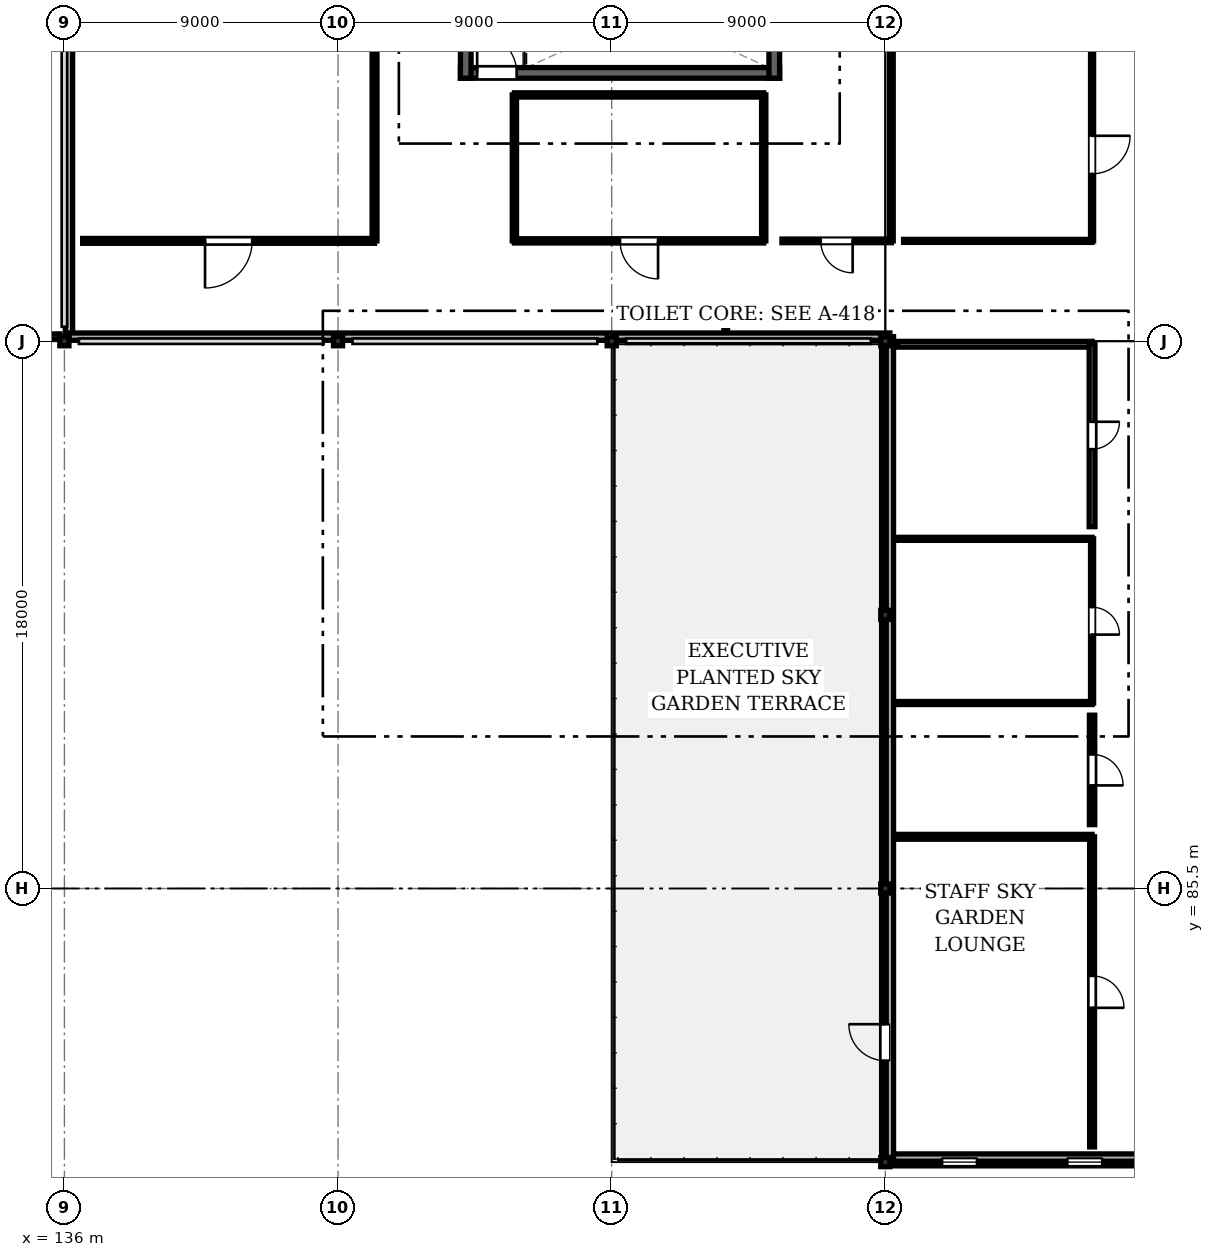
"""IFC4 building model, lengths in metres.
Left out: names, types, materials, properties, quantities, classifications, styles, units other than length and angle.
Written with IfcOpenShell. Run it as: python <this file> out.ifc"""

import sys

from ifc_helpers import new_model, si_unit, direction, frame, frame_2d, origin, origin_2d, place, context, subcontext, project, spatial, rectangle, i_section, extrude, element, fill, save


model = new_model("IFC4")
c1 = context("Model", 3, precision=1e-05, world=origin(), true_north=direction((0.0, 1.0)))
c2 = subcontext(c1, "Body", "Model", "MODEL_VIEW")
j1 = project(units=[si_unit("LENGTHUNIT", "METRE"), si_unit("PLANEANGLEUNIT", "RADIAN")], contexts=[c1])
p1 = place(None, origin())
s1 = spatial("IfcSite", under=j1, at=p1, CompositionType="ELEMENT")
p2 = place(p1, origin())
s2 = spatial("IfcBuilding", under=s1, at=p2, CompositionType="ELEMENT")
p3 = place(p2, frame((0.0, 0.0, 20.8)))
s3 = spatial("IfcBuildingStorey", under=s2, at=p3, CompositionType="ELEMENT", Elevation=20.8)
for number, where, z_axis, x_axis in (
    (1, (136.0, 103.5, 0.0), (0.0, 0.0, 1.0), (1.0, 0.0, 0.0)),
    (2, (145.0, 103.5, 0.0), (0.0, 0.0, 1.0), (1.0, 0.0, 0.0)),
    (3, (154.0, 103.5, 0.0), (0.0, 0.0, 1.0), (1.0, 0.0, 0.0)),
    (4, (163.0, 76.5, 0.0), (0.0, 0.0, 1.0), (1.0, 0.0, 0.0)),
    (5, (163.0, 85.5, 0.0), (0.0, 0.0, 1.0), (1.0, 0.0, 0.0)),
    (6, (163.0, 94.5, 0.0), (0.0, 0.0, 1.0), (1.0, 0.0, 0.0)),
    (7, (163.0, 103.5, 0.0), (0.0, 0.0, 1.0), (1.0, 0.0, 0.0)),
):
    element("IfcColumn", number, at=place(p3, frame(where, z_axis=z_axis, x_axis=x_axis)), inside=s3, PredefinedType="COLUMN", context=c2, shape_type="SweptSolid", body=[
        extrude(i_section(OverallWidth=0.3, OverallDepth=0.3, WebThickness=0.01, FlangeThickness=0.015, FilletRadius=0.018, at=origin_2d()), origin(), (0.0, 0.0, 1.0), 2.85),
    ])
p4 = place(p3, frame((171.995, 76.5, 0.0), z_axis=(0.0, 0.0, 1.0), x_axis=(-1.0, 0.0, 0.0)))
e8 = element("IfcWall", 8, at=p4, inside=s3, PredefinedType="SOLIDWALL", context=c2, shape_type="SweptSolid", body=[
    extrude(rectangle(XDim=8.99, YDim=0.245, at=frame_2d((4.495, 0.0))), origin(), (0.0, 0.0, 1.0), 2.23),
])
p5 = place(p4, frame((1.86, 0.0, 0.7)))
e9 = element("IfcOpeningElement", 9, at=p5, cuts=e8, PredefinedType="OPENING", context=c2, shape_type="SweptSolid", body=[
    extrude(rectangle(XDim=1.15, YDim=1.45, at=frame_2d((0.575, 0.725))), frame((0.0, 0.133, 0.0), z_axis=(0.0, -1.0, 0.0), x_axis=(1.0, 0.0, 0.0)), (0.0, 0.0, 1.0), 0.265),
])
p6 = place(p4, frame((5.98, 0.0, 0.7)))
e10 = element("IfcOpeningElement", 10, at=p6, cuts=e8, PredefinedType="OPENING", context=c2, shape_type="SweptSolid", body=[
    extrude(rectangle(XDim=1.15, YDim=1.45, at=frame_2d((0.575, 0.725))), frame((0.0, 0.133, 0.0), z_axis=(0.0, -1.0, 0.0), x_axis=(1.0, 0.0, 0.0)), (0.0, 0.0, 1.0), 0.265),
])
p7 = place(p3, frame((163.0, 76.65, 0.0), z_axis=(0.0, 0.0, 1.0), x_axis=(0.0, 1.0, 0.0)))
e11 = element("IfcWall", 11, at=p7, inside=s3, PredefinedType="SOLIDWALL", context=c2, shape_type="SweptSolid", body=[
    extrude(rectangle(XDim=8.7, YDim=0.245, at=frame_2d((4.35, 0.0))), origin(), (0.0, 0.0, 1.0), 2.23),
])
p8 = place(p7, frame((3.187, 0.0, 0.0)))
e12 = element("IfcOpeningElement", 12, at=p8, cuts=e11, PredefinedType="OPENING", context=c2, shape_type="SweptSolid", body=[
    extrude(rectangle(XDim=1.2, YDim=2.1, at=frame_2d((0.6, 1.05))), frame((0.0, 0.133, 0.0), z_axis=(0.0, -1.0, 0.0), x_axis=(1.0, 0.0, 0.0)), (0.0, 0.0, 1.0), 0.265),
])
p9 = place(p3, frame((163.0, 85.65, 0.0), z_axis=(0.0, 0.0, 1.0), x_axis=(0.0, 1.0, 0.0)))
e13 = element("IfcWall", 13, at=p9, inside=s3, PredefinedType="SOLIDWALL", context=c2, shape_type="SweptSolid", body=[
    extrude(rectangle(XDim=8.7, YDim=0.245, at=frame_2d((4.35, 0.0))), origin(), (0.0, 0.0, 1.0), 2.23),
])
p10 = place(p3, frame((163.0, 94.65, 0.0), z_axis=(0.0, 0.0, 1.0), x_axis=(0.0, 1.0, 0.0)))
e14 = element("IfcWall", 14, at=p10, inside=s3, PredefinedType="SOLIDWALL", context=c2, shape_type="SweptSolid", body=[
    extrude(rectangle(XDim=8.7, YDim=0.245, at=frame_2d((4.35, 0.0))), origin(), (0.0, 0.0, 1.0), 2.18),
])
p11 = place(p3, frame((126.15, 103.65, 0.0), z_axis=(0.0, 0.0, 1.0), x_axis=(1.0, 0.0, 0.0)))
e15 = element("IfcWall", 15, at=p11, inside=s3, PredefinedType="PARAPET", context=c2, shape_type="SweptSolid", body=[
    extrude(rectangle(XDim=9.7, YDim=0.18, at=frame_2d((4.85, 0.0))), origin(), (0.0, 0.0, 1.0), 1.15),
])
p12 = place(p3, frame((163.15, 76.65, 2.85), z_axis=(0.0, 0.0, 1.0), x_axis=(1.0, 0.0, 0.0)))
e16 = element("IfcWall", 16, at=p12, inside=s3, PredefinedType="PARAPET", context=c2, shape_type="SweptSolid", body=[
    extrude(rectangle(XDim=24.7, YDim=0.24, at=frame_2d((12.35, 0.0))), origin(), (0.0, 0.0, 1.0), 0.34),
])
p13 = place(p3, frame((136.15, 125.85, 2.85), z_axis=(0.0, 0.0, 1.0), x_axis=(0.0, -1.0, 0.0)))
e17 = element("IfcWall", 17, at=p13, inside=s3, PredefinedType="PARAPET", context=c2, shape_type="SweptSolid", body=[
    extrude(rectangle(XDim=22.2, YDim=0.24, at=frame_2d((11.1, 0.0))), origin(), (0.0, 0.0, 1.0), 0.34),
])
for number, where, z_axis, x_axis in (
    (18, (136.15, 103.65, 2.85), (0.0, 0.0, 1.0), (1.0, 0.0, 0.0)),
    (19, (163.15, 103.65, 2.85), (0.0, 0.0, 1.0), (0.0, -1.0, 0.0)),
):
    element("IfcWall", number, at=place(p3, frame(where, z_axis=z_axis, x_axis=x_axis)), inside=s3, PredefinedType="PARAPET", context=c2, shape_type="SweptSolid", body=[
        extrude(rectangle(XDim=27.0, YDim=0.24, at=frame_2d((13.5, 0.0))), origin(), (0.0, 0.0, 1.0), 0.34),
    ])
p14 = place(p3, frame((149.025, 112.325, 0.0), z_axis=(0.0, 0.0, 1.0), x_axis=(1.0, 0.0, 0.0)))
e20 = element("IfcWall", 20, at=p14, inside=s3, PredefinedType="SHEAR", context=c2, shape_type="SweptSolid", body=[
    extrude(rectangle(XDim=10.498, YDim=0.35, at=frame_2d((5.249, 0.0))), origin(), (0.0, 0.0, 1.0), 2.645),
])
p15 = place(p14, frame((0.55, 0.0, 0.0)))
e21 = element("IfcOpeningElement", 21, at=p15, cuts=e20, PredefinedType="OPENING", context=c2, shape_type="SweptSolid", body=[
    extrude(rectangle(XDim=1.3, YDim=2.1, at=frame_2d((0.65, 1.05))), frame((0.0, 0.185, 0.0), z_axis=(0.0, -1.0, 0.0), x_axis=(1.0, 0.0, 0.0)), (0.0, 0.0, 1.0), 0.37),
])
for number, where, z_axis, x_axis in (
    (22, (159.347, 112.15, 0.0), (0.0, 0.0, 1.0), (0.0, 1.0, 0.0)),
    (23, (149.2, 116.47, 0.0), (0.0, 0.0, 1.0), (0.0, -1.0, 0.0)),
):
    element("IfcWall", number, at=place(p3, frame(where, z_axis=z_axis, x_axis=x_axis)), inside=s3, PredefinedType="SHEAR", context=c2, shape_type="SweptSolid", body=[
        extrude(rectangle(XDim=4.32, YDim=0.35, at=frame_2d((2.16, 0.0))), origin(), (0.0, 0.0, 1.0), 2.645),
    ])
p16 = place(p3, frame((146.2, 106.8, 0.0), z_axis=(0.0, 0.0, 1.0), x_axis=(-1.0, 0.0, 0.0)))
e24 = element("IfcWall", 24, at=p16, inside=s3, PredefinedType="PARTITIONING", context=c2, shape_type="SweptSolid", body=[
    extrude(rectangle(XDim=9.6, YDim=0.16, at=frame_2d((4.8, 0.0))), origin(), (0.0, 0.0, 1.0), 2.18),
])
p17 = place(p16, frame((4.025, 0.0, 0.0)))
e25 = element("IfcOpeningElement", 25, at=p17, cuts=e24, PredefinedType="OPENING", context=c2, shape_type="SweptSolid", body=[
    extrude(rectangle(XDim=1.55, YDim=2.1, at=frame_2d((0.775, 1.05))), frame((0.0, 0.09, 0.0), z_axis=(0.0, -1.0, 0.0), x_axis=(1.0, 0.0, 0.0)), (0.0, 0.0, 1.0), 0.18),
])
p18 = place(p3, frame((146.2, 125.4, 0.0), z_axis=(0.0, 0.0, 1.0), x_axis=(0.0, -1.0, 0.0)))
e26 = element("IfcWall", 26, at=p18, inside=s3, PredefinedType="PARTITIONING", context=c2, shape_type="SweptSolid", body=[
    extrude(rectangle(XDim=18.6, YDim=0.16, at=frame_2d((9.3, 0.0))), origin(), (0.0, 0.0, 1.0), 2.23),
])
p19 = place(p3, frame((159.0, 106.8, 0.0), z_axis=(0.0, 0.0, 1.0), x_axis=(-1.0, 0.0, 0.0)))
e27 = element("IfcWall", 27, at=p19, inside=s3, PredefinedType="PARTITIONING", context=c2, shape_type="SweptSolid", body=[
    extrude(rectangle(XDim=8.2, YDim=0.14, at=frame_2d((4.1, 0.0))), origin(), (0.0, 0.0, 1.0), 2.18),
])
p20 = place(p19, frame((3.475, 0.0, 0.0)))
e28 = element("IfcOpeningElement", 28, at=p20, cuts=e27, PredefinedType="OPENING", context=c2, shape_type="SweptSolid", body=[
    extrude(rectangle(XDim=1.25, YDim=2.1, at=frame_2d((0.625, 1.05))), frame((0.0, 0.08, 0.0), z_axis=(0.0, -1.0, 0.0), x_axis=(1.0, 0.0, 0.0)), (0.0, 0.0, 1.0), 0.16),
])
p21 = place(p3, frame((150.8, 111.6, 0.0), z_axis=(0.0, 0.0, 1.0), x_axis=(1.0, 0.0, 0.0)))
e29 = element("IfcWall", 29, at=p21, inside=s3, PredefinedType="PARTITIONING", context=c2, shape_type="SweptSolid", body=[
    extrude(rectangle(XDim=8.2, YDim=0.14, at=frame_2d((4.1, 0.0))), origin(), (0.0, 0.0, 1.0), 2.18),
])
p22 = place(p3, frame((150.8, 106.8, 0.0), z_axis=(0.0, 0.0, 1.0), x_axis=(0.0, 1.0, 0.0)))
e30 = element("IfcWall", 30, at=p22, inside=s3, PredefinedType="PARTITIONING", context=c2, shape_type="SweptSolid", body=[
    extrude(rectangle(XDim=4.8, YDim=0.14, at=frame_2d((2.4, 0.0))), origin(), (0.0, 0.0, 1.0), 2.62),
])
p23 = place(p3, frame((159.0, 111.6, 0.0), z_axis=(0.0, 0.0, 1.0), x_axis=(0.0, -1.0, 0.0)))
e31 = element("IfcWall", 31, at=p23, inside=s3, PredefinedType="PARTITIONING", context=c2, shape_type="SweptSolid", body=[
    extrude(rectangle(XDim=4.8, YDim=0.14, at=frame_2d((2.4, 0.0))), origin(), (0.0, 0.0, 1.0), 2.22),
])
p24 = place(p3, frame((163.2, 106.8, 0.0), z_axis=(0.0, 0.0, 1.0), x_axis=(-1.0, 0.0, 0.0)))
e32 = element("IfcWall", 32, at=p24, inside=s3, PredefinedType="PARTITIONING", context=c2, shape_type="SweptSolid", body=[
    extrude(rectangle(XDim=3.6, YDim=0.12, at=frame_2d((1.8, 0.0))), origin(), (0.0, 0.0, 1.0), 2.18),
])
p25 = place(p24, frame((1.275, 0.0, 0.0)))
e33 = element("IfcOpeningElement", 33, at=p25, cuts=e32, PredefinedType="OPENING", context=c2, shape_type="SweptSolid", body=[
    extrude(rectangle(XDim=1.05, YDim=2.1, at=frame_2d((0.525, 1.05))), frame((0.0, 0.07, 0.0), z_axis=(0.0, -1.0, 0.0), x_axis=(1.0, 0.0, 0.0)), (0.0, 0.0, 1.0), 0.14),
])
p26 = place(p3, frame((163.2, 121.2, 0.0), z_axis=(0.0, 0.0, 1.0), x_axis=(0.0, -1.0, 0.0)))
e34 = element("IfcWall", 34, at=p26, inside=s3, PredefinedType="PARTITIONING", context=c2, shape_type="SweptSolid", body=[
    extrude(rectangle(XDim=14.4, YDim=0.12, at=frame_2d((7.2, 0.0))), origin(), (0.0, 0.0, 1.0), 2.18),
])
p27 = place(p3, frame((169.8, 106.8, 0.0), z_axis=(0.0, 0.0, 1.0), x_axis=(-1.0, 0.0, 0.0)))
e35 = element("IfcWall", 35, at=p27, inside=s3, PredefinedType="PARTITIONING", context=c2, shape_type="SweptSolid", body=[
    extrude(rectangle(XDim=6.2, YDim=0.1, at=frame_2d((3.1, 0.0))), origin(), (0.0, 0.0, 1.0), 2.18),
])
p28 = place(p3, frame((169.8, 121.2, 0.0), z_axis=(0.0, 0.0, 1.0), x_axis=(0.0, -1.0, 0.0)))
e36 = element("IfcWall", 36, at=p28, inside=s3, PredefinedType="PARTITIONING", context=c2, shape_type="SweptSolid", body=[
    extrude(rectangle(XDim=14.4, YDim=0.1, at=frame_2d((7.2, 0.0))), origin(), (0.0, 0.0, 1.0), 2.23),
])
p29 = place(p28, frame((6.575, 0.0, 0.0)))
e37 = element("IfcOpeningElement", 37, at=p29, cuts=e36, PredefinedType="OPENING", context=c2, shape_type="SweptSolid", body=[
    extrude(rectangle(XDim=1.25, YDim=2.1, at=frame_2d((0.625, 1.05))), frame((0.0, 0.06, 0.0), z_axis=(0.0, -1.0, 0.0), x_axis=(1.0, 0.0, 0.0)), (0.0, 0.0, 1.0), 0.12),
])
p30 = place(p28, frame((10.944, 0.0, 0.0)))
e38 = element("IfcOpeningElement", 38, at=p30, cuts=e36, PredefinedType="OPENING", context=c2, shape_type="SweptSolid", body=[
    extrude(rectangle(XDim=1.25, YDim=2.1, at=frame_2d((0.625, 1.05))), frame((0.0, 0.06, 0.0), z_axis=(0.0, -1.0, 0.0), x_axis=(1.0, 0.0, 0.0)), (0.0, 0.0, 1.0), 0.12),
])
p31 = place(p3, frame((163.4, 87.2, 0.0), z_axis=(0.0, 0.0, 1.0), x_axis=(1.0, 0.0, 0.0)))
e39 = element("IfcWall", 39, at=p31, inside=s3, PredefinedType="PARTITIONING", context=c2, shape_type="SweptSolid", body=[
    extrude(rectangle(XDim=6.4, YDim=0.16, at=frame_2d((3.2, 0.0))), origin(), (0.0, 0.0, 1.0), 2.23),
])
p32 = place(p3, frame((169.8, 87.2, 0.0), z_axis=(0.0, 0.0, 1.0), x_axis=(0.0, -1.0, 0.0)))
e40 = element("IfcWall", 40, at=p32, inside=s3, PredefinedType="PARTITIONING", context=c2, shape_type="SweptSolid", body=[
    extrude(rectangle(XDim=10.2, YDim=0.16, at=frame_2d((5.1, 0.0))), origin(), (0.0, 0.0, 1.0), 2.23),
])
p33 = place(p32, frame((4.575, 0.0, 0.0)))
e41 = element("IfcOpeningElement", 41, at=p33, cuts=e40, PredefinedType="OPENING", context=c2, shape_type="SweptSolid", body=[
    extrude(rectangle(XDim=1.05, YDim=2.1, at=frame_2d((0.525, 1.05))), frame((0.0, 0.09, 0.0), z_axis=(0.0, -1.0, 0.0), x_axis=(1.0, 0.0, 0.0)), (0.0, 0.0, 1.0), 0.18),
])
for number, where, z_axis, x_axis in (
    (42, (169.8, 91.6, 0.0), (0.0, 0.0, 1.0), (-1.0, 0.0, 0.0)),
    (43, (163.4, 97.0, 0.0), (0.0, 0.0, 1.0), (1.0, 0.0, 0.0)),
):
    element("IfcWall", number, at=place(p3, frame(where, z_axis=z_axis, x_axis=x_axis)), inside=s3, PredefinedType="PARTITIONING", context=c2, shape_type="SweptSolid", body=[
        extrude(rectangle(XDim=6.4, YDim=0.1, at=frame_2d((3.2, 0.0))), origin(), (0.0, 0.0, 1.0), 2.23),
    ])
p34 = place(p3, frame((169.8, 97.0, 0.0), z_axis=(0.0, 0.0, 1.0), x_axis=(0.0, -1.0, 0.0)))
e44 = element("IfcWall", 44, at=p34, inside=s3, PredefinedType="PARTITIONING", context=c2, shape_type="SweptSolid", body=[
    extrude(rectangle(XDim=5.4, YDim=0.1, at=frame_2d((2.7, 0.0))), origin(), (0.0, 0.0, 1.0), 2.23),
])
p35 = place(p34, frame((2.25, 0.0, 0.0)))
e45 = element("IfcOpeningElement", 45, at=p35, cuts=e44, PredefinedType="OPENING", context=c2, shape_type="SweptSolid", body=[
    extrude(rectangle(XDim=0.9, YDim=2.1, at=frame_2d((0.45, 1.05))), frame((0.0, 0.06, 0.0), z_axis=(0.0, -1.0, 0.0), x_axis=(1.0, 0.0, 0.0)), (0.0, 0.0, 1.0), 0.12),
])
p36 = place(p3, frame((163.4, 103.4, 0.0), z_axis=(0.0, 0.0, 1.0), x_axis=(1.0, 0.0, 0.0)))
e46 = element("IfcWall", 46, at=p36, inside=s3, PredefinedType="PARTITIONING", context=c2, shape_type="SweptSolid", body=[
    extrude(rectangle(XDim=6.4, YDim=0.19, at=frame_2d((3.2, 0.0))), origin(), (0.0, 0.0, 1.0), 2.18),
])
p37 = place(p3, frame((169.8, 103.4, 0.0), z_axis=(0.0, 0.0, 1.0), x_axis=(0.0, -1.0, 0.0)))
e47 = element("IfcWall", 47, at=p37, inside=s3, PredefinedType="PARTITIONING", context=c2, shape_type="SweptSolid", body=[
    extrude(rectangle(XDim=6.0, YDim=0.19, at=frame_2d((3.0, 0.0))), origin(), (0.0, 0.0, 1.0), 2.23),
])
p38 = place(p37, frame((2.55, 0.0, 0.0)))
e48 = element("IfcOpeningElement", 48, at=p38, cuts=e47, PredefinedType="OPENING", context=c2, shape_type="SweptSolid", body=[
    extrude(rectangle(XDim=0.9, YDim=2.1, at=frame_2d((0.45, 1.05))), frame((0.0, 0.105, 0.0), z_axis=(0.0, -1.0, 0.0), x_axis=(1.0, 0.0, 0.0)), (0.0, 0.0, 1.0), 0.21),
])
p39 = place(p3, frame((169.8, 91.2, 0.0), z_axis=(0.0, 0.0, 1.0), x_axis=(0.0, -1.0, 0.0)))
e49 = element("IfcWall", 49, at=p39, inside=s3, PredefinedType="PARTITIONING", context=c2, shape_type="SweptSolid", body=[
    extrude(rectangle(XDim=3.6, YDim=0.175, at=frame_2d((1.8, 0.0))), origin(), (0.0, 0.0, 1.0), 2.62),
])
p40 = place(p39, frame((1.29, 0.0, 0.0)))
e50 = element("IfcOpeningElement", 50, at=p40, cuts=e49, PredefinedType="OPENING", context=c2, shape_type="SweptSolid", body=[
    extrude(rectangle(XDim=1.02, YDim=2.05, at=frame_2d((0.51, 1.025))), frame((0.0, 0.097, 0.0), z_axis=(0.0, -1.0, 0.0), x_axis=(1.0, 0.0, 0.0)), (0.0, 0.0, 1.0), 0.195),
])
p41 = place(p5, origin())
e51 = element("IfcWindow", 51, at=p41, inside=s3, PartitioningType="SINGLE_PANEL", PredefinedType="WINDOW", context=c2, shape_type="SweptSolid", body=[
    extrude(rectangle(XDim=1.15, YDim=1.45, at=frame_2d((0.575, 0.725))), frame((0.0, 0.03, 0.0), z_axis=(0.0, -1.0, 0.0), x_axis=(1.0, 0.0, 0.0)), (0.0, 0.0, 1.0), 0.06),
])
fill(e9, e51)
p42 = place(p6, origin())
e52 = element("IfcWindow", 52, at=p42, inside=s3, PartitioningType="SINGLE_PANEL", PredefinedType="WINDOW", context=c2, shape_type="SweptSolid", body=[
    extrude(rectangle(XDim=1.15, YDim=1.45, at=frame_2d((0.575, 0.725))), frame((0.0, 0.03, 0.0), z_axis=(0.0, -1.0, 0.0), x_axis=(1.0, 0.0, 0.0)), (0.0, 0.0, 1.0), 0.06),
])
fill(e10, e52)
p43 = place(p8, origin())
e53 = element("IfcDoor", 53, at=p43, inside=s3, OperationType="SINGLE_SWING_RIGHT", PredefinedType="DOOR", context=c2, shape_type="SweptSolid", body=[
    extrude(rectangle(XDim=1.2, YDim=2.1, at=frame_2d((0.6, 1.05))), frame((0.0, 0.025, 0.0), z_axis=(0.0, -1.0, 0.0), x_axis=(1.0, 0.0, 0.0)), (0.0, 0.0, 1.0), 0.05),
])
fill(e12, e53)
p44 = place(p15, origin())
e54 = element("IfcDoor", 54, at=p44, inside=s3, OperationType="SINGLE_SWING_LEFT", PredefinedType="DOOR", context=c2, shape_type="SweptSolid", body=[
    extrude(rectangle(XDim=1.3, YDim=2.1, at=frame_2d((0.65, 1.05))), frame((0.0, 0.025, 0.0), z_axis=(0.0, -1.0, 0.0), x_axis=(1.0, 0.0, 0.0)), (0.0, 0.0, 1.0), 0.05),
])
fill(e21, e54)
p45 = place(p17, origin())
e55 = element("IfcDoor", 55, at=p45, inside=s3, OperationType="SINGLE_SWING_RIGHT", PredefinedType="DOOR", context=c2, shape_type="SweptSolid", body=[
    extrude(rectangle(XDim=1.55, YDim=2.1, at=frame_2d((0.775, 1.05))), frame((0.0, 0.025, 0.0), z_axis=(0.0, -1.0, 0.0), x_axis=(1.0, 0.0, 0.0)), (0.0, 0.0, 1.0), 0.05),
])
fill(e25, e55)
p46 = place(p20, origin())
e56 = element("IfcDoor", 56, at=p46, inside=s3, OperationType="SINGLE_SWING_LEFT", PredefinedType="DOOR", context=c2, shape_type="SweptSolid", body=[
    extrude(rectangle(XDim=1.25, YDim=2.1, at=frame_2d((0.625, 1.05))), frame((0.0, 0.025, 0.0), z_axis=(0.0, -1.0, 0.0), x_axis=(1.0, 0.0, 0.0)), (0.0, 0.0, 1.0), 0.05),
])
fill(e28, e56)
p47 = place(p25, origin())
e57 = element("IfcDoor", 57, at=p47, inside=s3, OperationType="SINGLE_SWING_LEFT", PredefinedType="DOOR", context=c2, shape_type="SweptSolid", body=[
    extrude(rectangle(XDim=1.05, YDim=2.1, at=frame_2d((0.525, 1.05))), frame((0.0, 0.025, 0.0), z_axis=(0.0, -1.0, 0.0), x_axis=(1.0, 0.0, 0.0)), (0.0, 0.0, 1.0), 0.05),
])
fill(e33, e57)
p48 = place(p30, origin())
e58 = element("IfcDoor", 58, at=p48, inside=s3, OperationType="SINGLE_SWING_LEFT", PredefinedType="DOOR", context=c2, shape_type="SweptSolid", body=[
    extrude(rectangle(XDim=1.25, YDim=2.1, at=frame_2d((0.625, 1.05))), frame((0.0, 0.025, 0.0), z_axis=(0.0, -1.0, 0.0), x_axis=(1.0, 0.0, 0.0)), (0.0, 0.0, 1.0), 0.05),
])
fill(e38, e58)
p49 = place(p33, origin())
e59 = element("IfcDoor", 59, at=p49, inside=s3, OperationType="SINGLE_SWING_RIGHT", PredefinedType="DOOR", context=c2, shape_type="SweptSolid", body=[
    extrude(rectangle(XDim=1.05, YDim=2.1, at=frame_2d((0.525, 1.05))), frame((0.0, 0.025, 0.0), z_axis=(0.0, -1.0, 0.0), x_axis=(1.0, 0.0, 0.0)), (0.0, 0.0, 1.0), 0.05),
])
fill(e41, e59)
p50 = place(p35, origin())
e60 = element("IfcDoor", 60, at=p50, inside=s3, OperationType="SINGLE_SWING_RIGHT", PredefinedType="DOOR", context=c2, shape_type="SweptSolid", body=[
    extrude(rectangle(XDim=0.9, YDim=2.1, at=frame_2d((0.45, 1.05))), frame((0.0, 0.025, 0.0), z_axis=(0.0, -1.0, 0.0), x_axis=(1.0, 0.0, 0.0)), (0.0, 0.0, 1.0), 0.05),
])
fill(e45, e60)
p51 = place(p38, origin())
e61 = element("IfcDoor", 61, at=p51, inside=s3, OperationType="SINGLE_SWING_LEFT", PredefinedType="DOOR", context=c2, shape_type="SweptSolid", body=[
    extrude(rectangle(XDim=0.9, YDim=2.1, at=frame_2d((0.45, 1.05))), frame((0.0, 0.025, 0.0), z_axis=(0.0, -1.0, 0.0), x_axis=(1.0, 0.0, 0.0)), (0.0, 0.0, 1.0), 0.05),
])
fill(e48, e61)
p52 = place(p40, origin())
e62 = element("IfcDoor", 62, at=p52, inside=s3, OperationType="SINGLE_SWING_RIGHT", PredefinedType="DOOR", context=c2, shape_type="SweptSolid", body=[
    extrude(rectangle(XDim=1.02, YDim=2.05, at=frame_2d((0.51, 1.025))), frame((0.0, 0.025, 0.0), z_axis=(0.0, -1.0, 0.0), x_axis=(1.0, 0.0, 0.0)), (0.0, 0.0, 1.0), 0.05),
])
fill(e50, e62)
save(model, sys.argv[1])
